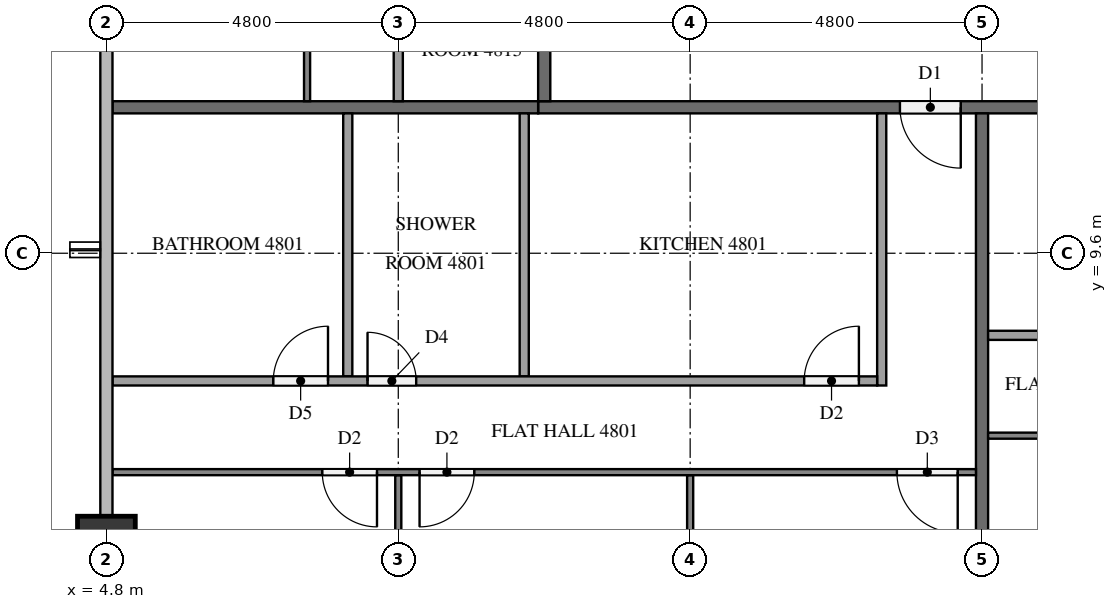
"""IFC4 building model, lengths in metres.
Left out: names, types, materials, properties, quantities, classifications, styles, units other than length and angle.
Written with IfcOpenShell. Run it as: python <this file> out.ifc"""

import sys

from ifc_helpers import new_model, si_unit, direction, frame, frame_2d, origin, origin_2d, place, context, subcontext, project, spatial, rectangle, extrude, element, fill, save


model = new_model("IFC4")
c1 = context("Model", 3, precision=1e-05, world=origin(), true_north=direction((0.0, 1.0)))
c2 = subcontext(c1, "Body", "Model", "MODEL_VIEW")
j1 = project(units=[si_unit("LENGTHUNIT", "METRE"), si_unit("PLANEANGLEUNIT", "RADIAN")], contexts=[c1])
p1 = place(None, origin())
s1 = spatial("IfcSite", under=j1, at=p1, CompositionType="ELEMENT")
p2 = place(p1, origin())
s2 = spatial("IfcBuilding", under=s1, at=p2, CompositionType="ELEMENT")
p3 = place(p2, frame((0.0, 0.0, 185.9)))
s3 = spatial("IfcBuildingStorey", under=s2, at=p3, CompositionType="ELEMENT", Elevation=185.9)
p4 = place(p3, frame((4.8, 4.8, 0.0), z_axis=(0.0, 0.0, 1.0), x_axis=(1.0, 0.0, 0.0)))
e1 = element("IfcColumn", 1, at=p4, inside=s3, PredefinedType="COLUMN", context=c2, shape_type="SweptSolid", body=[
    extrude(rectangle(XDim=0.95, YDim=0.95, at=origin_2d()), origin(), (0.0, 0.0, 1.0), 3.2),
])
p5 = place(p3, frame((50.5, 12.0, 0.0), z_axis=(0.0, 0.0, 1.0), x_axis=(-1.0, 0.0, 0.0)))
e2 = element("IfcWall", 2, at=p5, inside=s3, PredefinedType="PARTITIONING", context=c2, shape_type="SweptSolid", body=[
    extrude(rectangle(XDim=38.6, YDim=0.2, at=frame_2d((19.3, 0.0))), origin(), (0.0, 0.0, 1.0), 3.2),
])
p6 = place(p5, frame((31.65, 0.0, 0.0)))
e3 = element("IfcOpeningElement", 3, at=p6, cuts=e2, PredefinedType="OPENING", context=c2, shape_type="SweptSolid", body=[
    extrude(rectangle(XDim=1.0, YDim=2.1, at=frame_2d((0.5, 1.05))), frame((0.0, 0.11, 0.0), z_axis=(0.0, -1.0, 0.0), x_axis=(1.0, 0.0, 0.0)), (0.0, 0.0, 1.0), 0.22),
])
p7 = place(p5, frame((17.25, 0.0, 0.0)))
e4 = element("IfcOpeningElement", 4, at=p7, cuts=e2, PredefinedType="OPENING", context=c2, shape_type="SweptSolid", body=[
    extrude(rectangle(XDim=1.0, YDim=2.1, at=frame_2d((0.5, 1.05))), frame((0.0, 0.11, 0.0), z_axis=(0.0, -1.0, 0.0), x_axis=(1.0, 0.0, 0.0)), (0.0, 0.0, 1.0), 0.22),
])
p8 = place(p5, frame((7.65, 0.0, 0.0)))
e5 = element("IfcOpeningElement", 5, at=p8, cuts=e2, PredefinedType="OPENING", context=c2, shape_type="SweptSolid", body=[
    extrude(rectangle(XDim=1.0, YDim=2.1, at=frame_2d((0.5, 1.05))), frame((0.0, 0.11, 0.0), z_axis=(0.0, -1.0, 0.0), x_axis=(1.0, 0.0, 0.0)), (0.0, 0.0, 1.0), 0.22),
])
p9 = place(p5, frame((5.9, 0.0, 0.0)))
e6 = element("IfcOpeningElement", 6, at=p9, cuts=e2, PredefinedType="OPENING", context=c2, shape_type="SweptSolid", body=[
    extrude(rectangle(XDim=1.1, YDim=2.1, at=frame_2d((0.55, 1.05))), frame((0.0, 0.11, 0.0), z_axis=(0.0, -1.0, 0.0), x_axis=(1.0, 0.0, 0.0)), (0.0, 0.0, 1.0), 0.22),
])
p10 = place(p3, frame((12.0, 12.1, 0.0), z_axis=(0.0, 0.0, 1.0), x_axis=(0.0, 1.0, 0.0)))
e7 = element("IfcWall", 7, at=p10, inside=s3, PredefinedType="PARTITIONING", context=c2, shape_type="SweptSolid", body=[
    extrude(rectangle(XDim=28.6, YDim=0.2, at=frame_2d((14.3, 0.0))), origin(), (0.0, 0.0, 1.0), 3.2),
])
p11 = place(p10, frame((26.65, 0.0, 0.0)))
e8 = element("IfcOpeningElement", 8, at=p11, cuts=e7, PredefinedType="OPENING", context=c2, shape_type="SweptSolid", body=[
    extrude(rectangle(XDim=1.0, YDim=2.1, at=frame_2d((0.5, 1.05))), frame((0.0, 0.11, 0.0), z_axis=(0.0, -1.0, 0.0), x_axis=(1.0, 0.0, 0.0)), (0.0, 0.0, 1.0), 0.22),
])
p12 = place(p10, frame((24.95, 0.0, 0.0)))
e9 = element("IfcOpeningElement", 9, at=p12, cuts=e7, PredefinedType="OPENING", context=c2, shape_type="SweptSolid", body=[
    extrude(rectangle(XDim=1.0, YDim=2.1, at=frame_2d((0.5, 1.05))), frame((0.0, 0.11, 0.0), z_axis=(0.0, -1.0, 0.0), x_axis=(1.0, 0.0, 0.0)), (0.0, 0.0, 1.0), 0.22),
])
p13 = place(p10, frame((12.95, 0.0, 0.0)))
e10 = element("IfcOpeningElement", 10, at=p13, cuts=e7, PredefinedType="OPENING", context=c2, shape_type="SweptSolid", body=[
    extrude(rectangle(XDim=1.0, YDim=2.1, at=frame_2d((0.5, 1.05))), frame((0.0, 0.11, 0.0), z_axis=(0.0, -1.0, 0.0), x_axis=(1.0, 0.0, 0.0)), (0.0, 0.0, 1.0), 0.22),
])
p14 = place(p3, frame((19.2, 11.9, 0.0), z_axis=(0.0, 0.0, 1.0), x_axis=(0.0, -1.0, 0.0)))
e11 = element("IfcWall", 11, at=p14, inside=s3, PredefinedType="PARTITIONING", context=c2, shape_type="SweptSolid", body=[
    extrude(rectangle(XDim=11.575, YDim=0.2, at=frame_2d((5.788, 0.0))), origin(), (0.0, 0.0, 1.0), 3.2),
])
p15 = place(p3, frame((4.9, 12.0, 0.0), z_axis=(0.0, 0.0, 1.0), x_axis=(1.0, 0.0, 0.0)))
e12 = element("IfcWall", 12, at=p15, inside=s3, PredefinedType="PARTITIONING", context=c2, shape_type="SweptSolid", body=[
    extrude(rectangle(XDim=7.0, YDim=0.2, at=frame_2d((3.5, 0.0))), origin(), (0.0, 0.0, 1.0), 3.2),
])
p16 = place(p3, frame((14.4, 5.95, 0.0), z_axis=(0.0, 0.0, 1.0), x_axis=(0.0, -1.0, 0.0)))
e13 = element("IfcWall", 13, at=p16, inside=s3, PredefinedType="PARTITIONING", context=c2, shape_type="SweptSolid", body=[
    extrude(rectangle(XDim=5.85, YDim=0.1, at=frame_2d((2.925, 0.0))), origin(), (0.0, 0.0, 1.0), 3.2),
])
p17 = place(p3, frame((9.6, 5.95, 0.0), z_axis=(0.0, 0.0, 1.0), x_axis=(0.0, -1.0, 0.0)))
e14 = element("IfcWall", 14, at=p17, inside=s3, PredefinedType="PARTITIONING", context=c2, shape_type="SweptSolid", body=[
    extrude(rectangle(XDim=5.475, YDim=0.1, at=frame_2d((2.737, 0.0))), origin(), (0.0, 0.0, 1.0), 3.2),
])
p18 = place(p3, frame((19.1, 6.0, 0.0), z_axis=(0.0, 0.0, 1.0), x_axis=(-1.0, 0.0, 0.0)))
e15 = element("IfcWall", 15, at=p18, inside=s3, PredefinedType="PARTITIONING", context=c2, shape_type="SweptSolid", body=[
    extrude(rectangle(XDim=14.2, YDim=0.1, at=frame_2d((7.1, 0.0))), origin(), (0.0, 0.0, 1.0), 3.2),
])
p19 = place(p18, frame((0.3, 0.0, 0.0)))
e16 = element("IfcOpeningElement", 16, at=p19, cuts=e15, PredefinedType="OPENING", context=c2, shape_type="SweptSolid", body=[
    extrude(rectangle(XDim=1.0, YDim=2.1, at=frame_2d((0.5, 1.05))), frame((0.0, 0.06, 0.0), z_axis=(0.0, -1.0, 0.0), x_axis=(1.0, 0.0, 0.0)), (0.0, 0.0, 1.0), 0.12),
])
p20 = place(p18, frame((8.25, 0.0, 0.0)))
e17 = element("IfcOpeningElement", 17, at=p20, cuts=e15, PredefinedType="OPENING", context=c2, shape_type="SweptSolid", body=[
    extrude(rectangle(XDim=0.9, YDim=2.1, at=frame_2d((0.45, 1.05))), frame((0.0, 0.06, 0.0), z_axis=(0.0, -1.0, 0.0), x_axis=(1.0, 0.0, 0.0)), (0.0, 0.0, 1.0), 0.12),
])
p21 = place(p18, frame((9.85, 0.0, 0.0)))
e18 = element("IfcOpeningElement", 18, at=p21, cuts=e15, PredefinedType="OPENING", context=c2, shape_type="SweptSolid", body=[
    extrude(rectangle(XDim=0.9, YDim=2.1, at=frame_2d((0.45, 1.05))), frame((0.0, 0.06, 0.0), z_axis=(0.0, -1.0, 0.0), x_axis=(1.0, 0.0, 0.0)), (0.0, 0.0, 1.0), 0.12),
])
for number, where, z_axis, x_axis in (
    (19, (11.671, 11.9, 0.0), (0.0, 0.0, 1.0), (0.0, -1.0, 0.0)),
    (20, (8.769, 11.9, 0.0), (0.0, 0.0, 1.0), (0.0, -1.0, 0.0)),
):
    element("IfcWall", number, at=place(p3, frame(where, z_axis=z_axis, x_axis=x_axis)), inside=s3, PredefinedType="PARTITIONING", context=c2, shape_type="SweptSolid", body=[
        extrude(rectangle(XDim=4.325, YDim=0.15, at=frame_2d((2.163, 0.0))), origin(), (0.0, 0.0, 1.0), 3.2),
    ])
p22 = place(p3, frame((17.55, 11.9, 0.0), z_axis=(0.0, 0.0, 1.0), x_axis=(0.0, -1.0, 0.0)))
e21 = element("IfcWall", 21, at=p22, inside=s3, PredefinedType="PARTITIONING", context=c2, shape_type="SweptSolid", body=[
    extrude(rectangle(XDim=4.475, YDim=0.15, at=frame_2d((2.237, 0.0))), origin(), (0.0, 0.0, 1.0), 3.2),
])
p23 = place(p3, frame((4.9, 7.5, 0.0), z_axis=(0.0, 0.0, 1.0), x_axis=(1.0, 0.0, 0.0)))
e22 = element("IfcWall", 22, at=p23, inside=s3, PredefinedType="PARTITIONING", context=c2, shape_type="SweptSolid", body=[
    extrude(rectangle(XDim=12.575, YDim=0.15, at=frame_2d((6.288, 0.0))), origin(), (0.0, 0.0, 1.0), 3.2),
])
p24 = place(p23, frame((11.375, 0.0, 0.0)))
e23 = element("IfcOpeningElement", 23, at=p24, cuts=e22, PredefinedType="OPENING", context=c2, shape_type="SweptSolid", body=[
    extrude(rectangle(XDim=0.9, YDim=2.1, at=frame_2d((0.45, 1.05))), frame((0.0, 0.085, 0.0), z_axis=(0.0, -1.0, 0.0), x_axis=(1.0, 0.0, 0.0)), (0.0, 0.0, 1.0), 0.17),
])
p25 = place(p23, frame((4.194, 0.0, 0.0)))
e24 = element("IfcOpeningElement", 24, at=p25, cuts=e22, PredefinedType="OPENING", context=c2, shape_type="SweptSolid", body=[
    extrude(rectangle(XDim=0.8, YDim=2.1, at=frame_2d((0.4, 1.05))), frame((0.0, 0.085, 0.0), z_axis=(0.0, -1.0, 0.0), x_axis=(1.0, 0.0, 0.0)), (0.0, 0.0, 1.0), 0.17),
])
p26 = place(p23, frame((2.644, 0.0, 0.0)))
e25 = element("IfcOpeningElement", 25, at=p26, cuts=e22, PredefinedType="OPENING", context=c2, shape_type="SweptSolid", body=[
    extrude(rectangle(XDim=0.9, YDim=2.1, at=frame_2d((0.45, 1.05))), frame((0.0, 0.085, 0.0), z_axis=(0.0, -1.0, 0.0), x_axis=(1.0, 0.0, 0.0)), (0.0, 0.0, 1.0), 0.17),
])
p27 = place(p3, frame((33.5, 6.6, 0.0), z_axis=(0.0, 0.0, 1.0), x_axis=(-1.0, 0.0, 0.0)))
e26 = element("IfcWall", 26, at=p27, inside=s3, PredefinedType="PARTITIONING", context=c2, shape_type="SweptSolid", body=[
    extrude(rectangle(XDim=14.2, YDim=0.1, at=frame_2d((7.1, 0.0))), origin(), (0.0, 0.0, 1.0), 3.2),
])
p28 = place(p27, frame((0.3, 0.0, 0.0)))
e27 = element("IfcOpeningElement", 27, at=p28, cuts=e26, PredefinedType="OPENING", context=c2, shape_type="SweptSolid", body=[
    extrude(rectangle(XDim=0.9, YDim=2.1, at=frame_2d((0.45, 1.05))), frame((0.0, 0.06, 0.0), z_axis=(0.0, -1.0, 0.0), x_axis=(1.0, 0.0, 0.0)), (0.0, 0.0, 1.0), 0.12),
])
p29 = place(p27, frame((8.15, 0.0, 0.0)))
e28 = element("IfcOpeningElement", 28, at=p29, cuts=e26, PredefinedType="OPENING", context=c2, shape_type="SweptSolid", body=[
    extrude(rectangle(XDim=1.0, YDim=2.1, at=frame_2d((0.5, 1.05))), frame((0.0, 0.06, 0.0), z_axis=(0.0, -1.0, 0.0), x_axis=(1.0, 0.0, 0.0)), (0.0, 0.0, 1.0), 0.12),
])
p30 = place(p27, frame((9.85, 0.0, 0.0)))
e29 = element("IfcOpeningElement", 29, at=p30, cuts=e26, PredefinedType="OPENING", context=c2, shape_type="SweptSolid", body=[
    extrude(rectangle(XDim=0.9, YDim=2.1, at=frame_2d((0.45, 1.05))), frame((0.0, 0.06, 0.0), z_axis=(0.0, -1.0, 0.0), x_axis=(1.0, 0.0, 0.0)), (0.0, 0.0, 1.0), 0.12),
])
p31 = place(p3, frame((19.3, 8.25, 0.0), z_axis=(0.0, 0.0, 1.0), x_axis=(1.0, 0.0, 0.0)))
e30 = element("IfcWall", 30, at=p31, inside=s3, PredefinedType="PARTITIONING", context=c2, shape_type="SweptSolid", body=[
    extrude(rectangle(XDim=12.575, YDim=0.15, at=frame_2d((6.288, 0.0))), origin(), (0.0, 0.0, 1.0), 3.2),
])
p32 = place(p31, frame((11.475, 0.0, 0.0)))
e31 = element("IfcOpeningElement", 31, at=p32, cuts=e30, PredefinedType="OPENING", context=c2, shape_type="SweptSolid", body=[
    extrude(rectangle(XDim=0.8, YDim=2.1, at=frame_2d((0.4, 1.05))), frame((0.0, 0.085, 0.0), z_axis=(0.0, -1.0, 0.0), x_axis=(1.0, 0.0, 0.0)), (0.0, 0.0, 1.0), 0.17),
])
p33 = place(p31, frame((6.129, 0.0, 0.0)))
e32 = element("IfcOpeningElement", 32, at=p33, cuts=e30, PredefinedType="OPENING", context=c2, shape_type="SweptSolid", body=[
    extrude(rectangle(XDim=0.9, YDim=2.1, at=frame_2d((0.45, 1.05))), frame((0.0, 0.085, 0.0), z_axis=(0.0, -1.0, 0.0), x_axis=(1.0, 0.0, 0.0)), (0.0, 0.0, 1.0), 0.17),
])
p34 = place(p31, frame((4.579, 0.0, 0.0)))
e33 = element("IfcOpeningElement", 33, at=p34, cuts=e30, PredefinedType="OPENING", context=c2, shape_type="SweptSolid", body=[
    extrude(rectangle(XDim=0.9, YDim=2.1, at=frame_2d((0.45, 1.05))), frame((0.0, 0.085, 0.0), z_axis=(0.0, -1.0, 0.0), x_axis=(1.0, 0.0, 0.0)), (0.0, 0.0, 1.0), 0.17),
])
p35 = place(p3, frame((8.1, 12.1, 0.0), z_axis=(0.0, 0.0, 1.0), x_axis=(0.0, 1.0, 0.0)))
e34 = element("IfcWall", 34, at=p35, inside=s3, PredefinedType="PARTITIONING", context=c2, shape_type="SweptSolid", body=[
    extrude(rectangle(XDim=14.2, YDim=0.1, at=frame_2d((7.1, 0.0))), origin(), (0.0, 0.0, 1.0), 3.2),
])
p36 = place(p35, frame((13.0, 0.0, 0.0)))
e35 = element("IfcOpeningElement", 35, at=p36, cuts=e34, PredefinedType="OPENING", context=c2, shape_type="SweptSolid", body=[
    extrude(rectangle(XDim=0.9, YDim=2.1, at=frame_2d((0.45, 1.05))), frame((0.0, 0.06, 0.0), z_axis=(0.0, -1.0, 0.0), x_axis=(1.0, 0.0, 0.0)), (0.0, 0.0, 1.0), 0.12),
])
p37 = place(p35, frame((5.05, 0.0, 0.0)))
e36 = element("IfcOpeningElement", 36, at=p37, cuts=e34, PredefinedType="OPENING", context=c2, shape_type="SweptSolid", body=[
    extrude(rectangle(XDim=1.0, YDim=2.1, at=frame_2d((0.5, 1.05))), frame((0.0, 0.06, 0.0), z_axis=(0.0, -1.0, 0.0), x_axis=(1.0, 0.0, 0.0)), (0.0, 0.0, 1.0), 0.12),
])
p38 = place(p35, frame((3.45, 0.0, 0.0)))
e37 = element("IfcOpeningElement", 37, at=p38, cuts=e34, PredefinedType="OPENING", context=c2, shape_type="SweptSolid", body=[
    extrude(rectangle(XDim=0.9, YDim=2.1, at=frame_2d((0.45, 1.05))), frame((0.0, 0.06, 0.0), z_axis=(0.0, -1.0, 0.0), x_axis=(1.0, 0.0, 0.0)), (0.0, 0.0, 1.0), 0.12),
])
p39 = place(p3, frame((9.6, 24.675, 0.0), z_axis=(0.0, 0.0, 1.0), x_axis=(0.0, -1.0, 0.0)))
e38 = element("IfcWall", 38, at=p39, inside=s3, PredefinedType="PARTITIONING", context=c2, shape_type="SweptSolid", body=[
    extrude(rectangle(XDim=12.575, YDim=0.15, at=frame_2d((6.288, 0.0))), origin(), (0.0, 0.0, 1.0), 3.2),
])
p40 = place(p39, frame((0.3, 0.0, 0.0)))
e39 = element("IfcOpeningElement", 39, at=p40, cuts=e38, PredefinedType="OPENING", context=c2, shape_type="SweptSolid", body=[
    extrude(rectangle(XDim=0.9, YDim=2.1, at=frame_2d((0.45, 1.05))), frame((0.0, 0.085, 0.0), z_axis=(0.0, -1.0, 0.0), x_axis=(1.0, 0.0, 0.0)), (0.0, 0.0, 1.0), 0.17),
])
p41 = place(p39, frame((8.448, 0.0, 0.0)))
e40 = element("IfcOpeningElement", 40, at=p41, cuts=e38, PredefinedType="OPENING", context=c2, shape_type="SweptSolid", body=[
    extrude(rectangle(XDim=0.9, YDim=2.1, at=frame_2d((0.45, 1.05))), frame((0.0, 0.085, 0.0), z_axis=(0.0, -1.0, 0.0), x_axis=(1.0, 0.0, 0.0)), (0.0, 0.0, 1.0), 0.17),
])
p42 = place(p39, frame((9.998, 0.0, 0.0)))
e41 = element("IfcOpeningElement", 41, at=p42, cuts=e38, PredefinedType="OPENING", context=c2, shape_type="SweptSolid", body=[
    extrude(rectangle(XDim=0.8, YDim=2.1, at=frame_2d((0.4, 1.05))), frame((0.0, 0.085, 0.0), z_axis=(0.0, -1.0, 0.0), x_axis=(1.0, 0.0, 0.0)), (0.0, 0.0, 1.0), 0.17),
])
p43 = place(p6, origin())
e42 = element("IfcDoor", 42, at=p43, inside=s3, OperationType="SINGLE_SWING_LEFT", PredefinedType="DOOR", context=c2, shape_type="SweptSolid", body=[
    extrude(rectangle(XDim=1.0, YDim=2.1, at=frame_2d((0.5, 1.05))), frame((0.0, 0.025, 0.0), z_axis=(0.0, -1.0, 0.0), x_axis=(1.0, 0.0, 0.0)), (0.0, 0.0, 1.0), 0.05),
])
fill(e3, e42)
p44 = place(p19, origin())
e43 = element("IfcDoor", 43, at=p44, inside=s3, OperationType="SINGLE_SWING_LEFT", PredefinedType="DOOR", context=c2, shape_type="SweptSolid", body=[
    extrude(rectangle(XDim=1.0, YDim=2.1, at=frame_2d((0.5, 1.05))), frame((0.0, 0.025, 0.0), z_axis=(0.0, -1.0, 0.0), x_axis=(1.0, 0.0, 0.0)), (0.0, 0.0, 1.0), 0.05),
])
fill(e16, e43)
p45 = place(p20, origin())
e44 = element("IfcDoor", 44, at=p45, inside=s3, OperationType="SINGLE_SWING_RIGHT", PredefinedType="DOOR", context=c2, shape_type="SweptSolid", body=[
    extrude(rectangle(XDim=0.9, YDim=2.1, at=frame_2d((0.45, 1.05))), frame((0.0, 0.025, 0.0), z_axis=(0.0, -1.0, 0.0), x_axis=(1.0, 0.0, 0.0)), (0.0, 0.0, 1.0), 0.05),
])
fill(e17, e44)
p46 = place(p21, origin())
e45 = element("IfcDoor", 45, at=p46, inside=s3, OperationType="SINGLE_SWING_LEFT", PredefinedType="DOOR", context=c2, shape_type="SweptSolid", body=[
    extrude(rectangle(XDim=0.9, YDim=2.1, at=frame_2d((0.45, 1.05))), frame((0.0, 0.025, 0.0), z_axis=(0.0, -1.0, 0.0), x_axis=(1.0, 0.0, 0.0)), (0.0, 0.0, 1.0), 0.05),
])
fill(e18, e45)
p47 = place(p24, origin())
e46 = element("IfcDoor", 46, at=p47, inside=s3, OperationType="SINGLE_SWING_RIGHT", PredefinedType="DOOR", context=c2, shape_type="SweptSolid", body=[
    extrude(rectangle(XDim=0.9, YDim=2.1, at=frame_2d((0.45, 1.05))), frame((0.0, 0.025, 0.0), z_axis=(0.0, -1.0, 0.0), x_axis=(1.0, 0.0, 0.0)), (0.0, 0.0, 1.0), 0.05),
])
fill(e23, e46)
p48 = place(p25, origin())
e47 = element("IfcDoor", 47, at=p48, inside=s3, OperationType="SINGLE_SWING_LEFT", PredefinedType="DOOR", context=c2, shape_type="SweptSolid", body=[
    extrude(rectangle(XDim=0.8, YDim=2.1, at=frame_2d((0.4, 1.05))), frame((0.0, 0.025, 0.0), z_axis=(0.0, -1.0, 0.0), x_axis=(1.0, 0.0, 0.0)), (0.0, 0.0, 1.0), 0.05),
])
fill(e24, e47)
p49 = place(p26, origin())
e48 = element("IfcDoor", 48, at=p49, inside=s3, OperationType="SINGLE_SWING_RIGHT", PredefinedType="DOOR", context=c2, shape_type="SweptSolid", body=[
    extrude(rectangle(XDim=0.9, YDim=2.1, at=frame_2d((0.45, 1.05))), frame((0.0, 0.025, 0.0), z_axis=(0.0, -1.0, 0.0), x_axis=(1.0, 0.0, 0.0)), (0.0, 0.0, 1.0), 0.05),
])
fill(e25, e48)
save(model, sys.argv[1])
